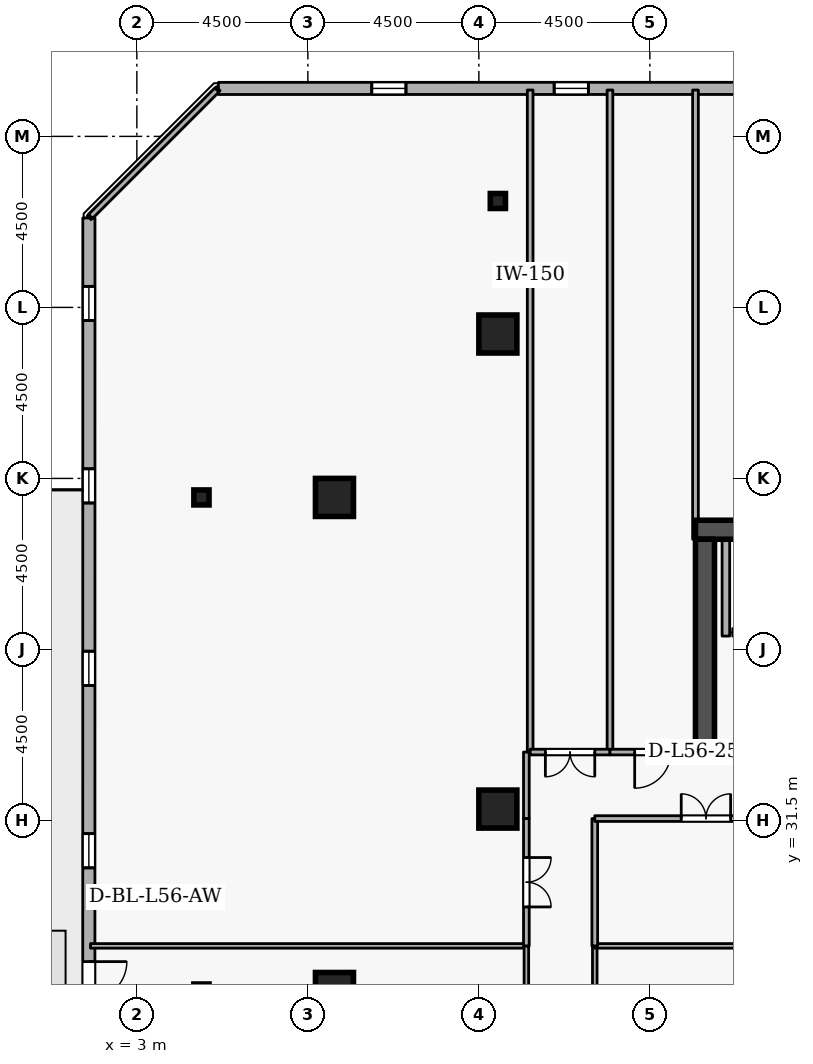
"""IFC4 building model, lengths in metres.
Left out: names, types, materials, properties, quantities, classifications, styles, units other than length and angle.
Written with IfcOpenShell. Run it as: python <this file> out.ifc"""

import sys

from ifc_helpers import new_model, si_unit, direction, frame, frame_2d, origin, origin_2d, place, context, subcontext, project, spatial, rectangle, i_section, extrude, element, fill, save


model = new_model("IFC4")
c1 = context("Model", 3, precision=1e-05, world=origin(), true_north=direction((0.0, 1.0)))
c2 = subcontext(c1, "Body", "Model", "MODEL_VIEW")
j1 = project(units=[si_unit("LENGTHUNIT", "METRE"), si_unit("PLANEANGLEUNIT", "RADIAN")], contexts=[c1])
p1 = place(None, origin())
s1 = spatial("IfcSite", under=j1, at=p1, CompositionType="ELEMENT")
p2 = place(p1, origin())
s2 = spatial("IfcBuilding", under=s1, at=p2, CompositionType="ELEMENT")
p3 = place(p2, frame((0.0, 0.0, 210.9)))
s3 = spatial("IfcBuildingStorey", under=s2, at=p3, CompositionType="ELEMENT", Elevation=210.9)
p4 = place(p3, frame((17.7, 39.15, 0.0), z_axis=(0.0, 0.0, 1.0), x_axis=(1.0, 0.0, 0.0)))
e1 = element("IfcWall", 1, at=p4, inside=s3, PredefinedType="SHEAR", context=c2, shape_type="SweptSolid", body=[
    extrude(rectangle(XDim=15.6, YDim=0.5, at=frame_2d((7.8, 0.0))), origin(), (0.0, 0.0, 1.0), 3.6),
])
p5 = place(p3, frame((17.95, 33.1, 0.0), z_axis=(0.0, 0.0, 1.0), x_axis=(0.0, 1.0, 0.0)))
e2 = element("IfcWall", 2, at=p5, inside=s3, PredefinedType="SHEAR", context=c2, shape_type="SweptSolid", body=[
    extrude(rectangle(XDim=5.8, YDim=0.5, at=frame_2d((2.9, 0.0))), origin(), (0.0, 0.0, 1.0), 3.6),
])
for number, where, z_axis, x_axis in (
    (3, (12.5, 44.3, 0.0), (0.0, 0.0, 1.0), (1.0, 0.0, 0.0)),
    (4, (8.2, 27.0, 0.0), (0.0, 0.0, 1.0), (1.0, 0.0, 0.0)),
    (5, (8.2, 40.0, 0.0), (0.0, 0.0, 1.0), (1.0, 0.0, 0.0)),
    (6, (12.5, 31.8, 0.0), (0.0, 0.0, 1.0), (1.0, 0.0, 0.0)),
):
    element("IfcColumn", number, at=place(p3, frame(where, z_axis=z_axis, x_axis=x_axis)), inside=s3, PredefinedType="COLUMN", context=c2, shape_type="SweptSolid", body=[
        extrude(rectangle(XDim=1.0, YDim=1.0, at=origin_2d()), origin(), (0.0, 0.0, 1.0), 3.6),
    ])
for number, where, z_axis, x_axis in (
    (7, (12.5, 47.8, 0.0), (0.0, 0.0, 1.0), (1.0, 0.0, 0.0)),
    (8, (4.7, 40.0, 0.0), (0.0, 0.0, 1.0), (1.0, 0.0, 0.0)),
):
    element("IfcColumn", number, at=place(p3, frame(where, z_axis=z_axis, x_axis=x_axis)), inside=s3, PredefinedType="COLUMN", context=c2, shape_type="SweptSolid", body=[
        extrude(i_section(OverallWidth=0.399, OverallDepth=0.394, WebThickness=0.023, FlangeThickness=0.037, FilletRadius=0.015, at=origin_2d()), origin(), (0.0, 0.0, 1.0), 3.6),
    ])
p6 = place(p3, frame((40.681, 50.765, 0.0), z_axis=(0.0, 0.0, 1.0), x_axis=(-0.999999997144, -7.5574884e-05, 0.0)))
e9 = element("IfcWall", 9, at=p6, inside=s3, PredefinedType="STANDARD", context=c2, shape_type="SweptSolid", body=[
    extrude(rectangle(XDim=35.535, YDim=0.32, at=frame_2d((17.768, 0.0))), origin(), (0.0, 0.0, 1.0), 2.7),
])
p7 = place(p6, frame((1.8, 0.0, 0.72)))
e10 = element("IfcOpeningElement", 10, at=p7, cuts=e9, PredefinedType="OPENING", context=c2, shape_type="SweptSolid", body=[
    extrude(rectangle(XDim=0.9, YDim=1.75, at=frame_2d((0.45, 0.875))), frame((0.0, 0.17, 0.0), z_axis=(0.0, -1.0, 0.0), x_axis=(1.0, 0.0, 0.0)), (0.0, 0.0, 1.0), 0.34),
])
p8 = place(p6, frame((6.6, 0.0, 0.72)))
e11 = element("IfcOpeningElement", 11, at=p8, cuts=e9, PredefinedType="OPENING", context=c2, shape_type="SweptSolid", body=[
    extrude(rectangle(XDim=0.9, YDim=1.75, at=frame_2d((0.45, 0.875))), frame((0.0, 0.17, 0.0), z_axis=(0.0, -1.0, 0.0), x_axis=(1.0, 0.0, 0.0)), (0.0, 0.0, 1.0), 0.34),
])
p9 = place(p6, frame((11.4, 0.0, 0.72)))
e12 = element("IfcOpeningElement", 12, at=p9, cuts=e9, PredefinedType="OPENING", context=c2, shape_type="SweptSolid", body=[
    extrude(rectangle(XDim=0.9, YDim=1.75, at=frame_2d((0.45, 0.875))), frame((0.0, 0.17, 0.0), z_axis=(0.0, -1.0, 0.0), x_axis=(1.0, 0.0, 0.0)), (0.0, 0.0, 1.0), 0.34),
])
p10 = place(p6, frame((16.2, 0.0, 0.72)))
e13 = element("IfcOpeningElement", 13, at=p10, cuts=e9, PredefinedType="OPENING", context=c2, shape_type="SweptSolid", body=[
    extrude(rectangle(XDim=0.9, YDim=1.75, at=frame_2d((0.45, 0.875))), frame((0.0, 0.17, 0.0), z_axis=(0.0, -1.0, 0.0), x_axis=(1.0, 0.0, 0.0)), (0.0, 0.0, 1.0), 0.34),
])
p11 = place(p6, frame((21.0, 0.0, 0.72)))
e14 = element("IfcOpeningElement", 14, at=p11, cuts=e9, PredefinedType="OPENING", context=c2, shape_type="SweptSolid", body=[
    extrude(rectangle(XDim=0.9, YDim=1.75, at=frame_2d((0.45, 0.875))), frame((0.0, 0.17, 0.0), z_axis=(0.0, -1.0, 0.0), x_axis=(1.0, 0.0, 0.0)), (0.0, 0.0, 1.0), 0.34),
])
p12 = place(p6, frame((25.8, 0.0, 0.72)))
e15 = element("IfcOpeningElement", 15, at=p12, cuts=e9, PredefinedType="OPENING", context=c2, shape_type="SweptSolid", body=[
    extrude(rectangle(XDim=0.9, YDim=1.75, at=frame_2d((0.45, 0.875))), frame((0.0, 0.17, 0.0), z_axis=(0.0, -1.0, 0.0), x_axis=(1.0, 0.0, 0.0)), (0.0, 0.0, 1.0), 0.34),
])
p13 = place(p6, frame((30.6, 0.0, 0.72)))
e16 = element("IfcOpeningElement", 16, at=p13, cuts=e9, PredefinedType="OPENING", context=c2, shape_type="SweptSolid", body=[
    extrude(rectangle(XDim=0.9, YDim=1.75, at=frame_2d((0.45, 0.875))), frame((0.0, 0.17, 0.0), z_axis=(0.0, -1.0, 0.0), x_axis=(1.0, 0.0, 0.0)), (0.0, 0.0, 1.0), 0.34),
])
p14 = place(p3, frame((1.738, 47.354, 0.0), z_axis=(0.0, 0.0, 1.0), x_axis=(-7.5574884e-05, -0.999999997144, 0.0)))
e17 = element("IfcWall", 17, at=p14, inside=s3, PredefinedType="STANDARD", context=c2, shape_type="SweptSolid", body=[
    extrude(rectangle(XDim=35.535, YDim=0.32, at=frame_2d((17.768, 0.0))), origin(), (0.0, 0.0, 1.0), 2.7),
])
p15 = place(p14, frame((19.567, 0.0, 0.0)))
e18 = element("IfcOpeningElement", 18, at=p15, cuts=e17, PredefinedType="OPENING", context=c2, shape_type="SweptSolid", body=[
    extrude(rectangle(XDim=1.0, YDim=2.08, at=frame_2d((0.5, 1.04))), frame((0.0, 0.17, 0.0), z_axis=(0.0, -1.0, 0.0), x_axis=(1.0, 0.0, 0.0)), (0.0, 0.0, 1.0), 0.34),
])
p16 = place(p14, frame((1.8, 0.0, 0.72)))
e19 = element("IfcOpeningElement", 19, at=p16, cuts=e17, PredefinedType="OPENING", context=c2, shape_type="SweptSolid", body=[
    extrude(rectangle(XDim=0.9, YDim=1.75, at=frame_2d((0.45, 0.875))), frame((0.0, 0.17, 0.0), z_axis=(0.0, -1.0, 0.0), x_axis=(1.0, 0.0, 0.0)), (0.0, 0.0, 1.0), 0.34),
])
p17 = place(p14, frame((6.6, 0.0, 0.72)))
e20 = element("IfcOpeningElement", 20, at=p17, cuts=e17, PredefinedType="OPENING", context=c2, shape_type="SweptSolid", body=[
    extrude(rectangle(XDim=0.9, YDim=1.75, at=frame_2d((0.45, 0.875))), frame((0.0, 0.17, 0.0), z_axis=(0.0, -1.0, 0.0), x_axis=(1.0, 0.0, 0.0)), (0.0, 0.0, 1.0), 0.34),
])
p18 = place(p14, frame((11.4, 0.0, 0.72)))
e21 = element("IfcOpeningElement", 21, at=p18, cuts=e17, PredefinedType="OPENING", context=c2, shape_type="SweptSolid", body=[
    extrude(rectangle(XDim=0.9, YDim=1.75, at=frame_2d((0.45, 0.875))), frame((0.0, 0.17, 0.0), z_axis=(0.0, -1.0, 0.0), x_axis=(1.0, 0.0, 0.0)), (0.0, 0.0, 1.0), 0.34),
])
p19 = place(p14, frame((16.2, 0.0, 0.72)))
e22 = element("IfcOpeningElement", 22, at=p19, cuts=e17, PredefinedType="OPENING", context=c2, shape_type="SweptSolid", body=[
    extrude(rectangle(XDim=0.9, YDim=1.75, at=frame_2d((0.45, 0.875))), frame((0.0, 0.17, 0.0), z_axis=(0.0, -1.0, 0.0), x_axis=(1.0, 0.0, 0.0)), (0.0, 0.0, 1.0), 0.34),
])
p20 = place(p14, frame((25.8, 0.0, 0.72)))
e23 = element("IfcOpeningElement", 23, at=p20, cuts=e17, PredefinedType="OPENING", context=c2, shape_type="SweptSolid", body=[
    extrude(rectangle(XDim=0.9, YDim=1.75, at=frame_2d((0.45, 0.875))), frame((0.0, 0.17, 0.0), z_axis=(0.0, -1.0, 0.0), x_axis=(1.0, 0.0, 0.0)), (0.0, 0.0, 1.0), 0.34),
])
p21 = place(p14, frame((30.6, 0.0, 0.72)))
e24 = element("IfcOpeningElement", 24, at=p21, cuts=e17, PredefinedType="OPENING", context=c2, shape_type="SweptSolid", body=[
    extrude(rectangle(XDim=0.9, YDim=1.75, at=frame_2d((0.45, 0.875))), frame((0.0, 0.17, 0.0), z_axis=(0.0, -1.0, 0.0), x_axis=(1.0, 0.0, 0.0)), (0.0, 0.0, 1.0), 0.34),
])
p22 = place(p3, frame((20.62, 36.45, 0.0), z_axis=(0.0, 0.0, 1.0), x_axis=(-1.0, 0.0, 0.0)))
e25 = element("IfcWall", 25, at=p22, inside=s3, PredefinedType="STANDARD", context=c2, shape_type="SweptSolid", body=[
    extrude(rectangle(XDim=1.94, YDim=0.2, at=frame_2d((0.97, 0.0))), origin(), (0.0, 0.0, 1.0), 3.34),
])
p23 = place(p22, frame((0.46, 0.0, 0.0)))
e26 = element("IfcOpeningElement", 26, at=p23, cuts=e25, PredefinedType="OPENING", context=c2, shape_type="SweptSolid", body=[
    extrude(rectangle(XDim=1.02, YDim=2.06, at=frame_2d((0.51, 1.03))), frame((0.0, 0.11, 0.0), z_axis=(0.0, -1.0, 0.0), x_axis=(1.0, 0.0, 0.0)), (0.0, 0.0, 1.0), 0.22),
])
p24 = place(p3, frame((18.5, 36.352, 0.0), z_axis=(0.0, 0.0, 1.0), x_axis=(0.0, 1.0, 0.0)))
e27 = element("IfcWall", 27, at=p24, inside=s3, PredefinedType="STANDARD", context=c2, shape_type="SweptSolid", body=[
    extrude(rectangle(XDim=2.536, YDim=0.2, at=frame_2d((1.268, 0.0))), origin(), (0.0, 0.0, 1.0), 3.34),
])
for number, where, z_axis, x_axis in (
    (28, (13.35, 33.3, 0.0), (0.0, 0.0, 1.0), (0.0, 1.0, 0.0)),
    (29, (15.45, 50.72, 0.0), (0.0, 0.0, 1.0), (0.0, -1.0, 0.0)),
):
    element("IfcWall", number, at=place(p3, frame(where, z_axis=z_axis, x_axis=x_axis)), inside=s3, PredefinedType="PARTITIONING", context=c2, shape_type="SweptSolid", body=[
        extrude(rectangle(XDim=17.42, YDim=0.15, at=frame_2d((8.71, 0.0))), origin(), (0.0, 0.0, 1.0), 3.34),
    ])
p25 = place(p3, frame((15.45, 33.3, 0.0), z_axis=(0.0, 0.0, 1.0), x_axis=(-1.0, 0.0, 0.0)))
e30 = element("IfcWall", 30, at=p25, inside=s3, PredefinedType="PARTITIONING", context=c2, shape_type="SweptSolid", body=[
    extrude(rectangle(XDim=2.1, YDim=0.15, at=frame_2d((1.05, 0.0))), origin(), (0.0, 0.0, 1.0), 3.34),
])
p26 = place(p25, frame((0.4, 0.0, 0.0)))
e31 = element("IfcOpeningElement", 31, at=p26, cuts=e30, PredefinedType="OPENING", context=c2, shape_type="SweptSolid", body=[
    extrude(rectangle(XDim=1.3, YDim=2.12, at=frame_2d((0.65, 1.06))), frame((0.0, 0.085, 0.0), z_axis=(0.0, -1.0, 0.0), x_axis=(1.0, 0.0, 0.0)), (0.0, 0.0, 1.0), 0.17),
])
p27 = place(p3, frame((17.7, 50.72, 0.0), z_axis=(0.0, 0.0, 1.0), x_axis=(0.0, -1.0, 0.0)))
e32 = element("IfcWall", 32, at=p27, inside=s3, PredefinedType="PARTITIONING", context=c2, shape_type="SweptSolid", body=[
    extrude(rectangle(XDim=11.82, YDim=0.15, at=frame_2d((5.91, 0.0))), origin(), (0.0, 0.0, 1.0), 2.545),
])
p28 = place(p3, frame((17.7, 33.3, 0.0), z_axis=(0.0, 0.0, 1.0), x_axis=(-1.0, 0.0, 0.0)))
e33 = element("IfcWall", 33, at=p28, inside=s3, PredefinedType="PARTITIONING", context=c2, shape_type="SweptSolid", body=[
    extrude(rectangle(XDim=2.25, YDim=0.15, at=frame_2d((1.125, 0.0))), origin(), (0.0, 0.0, 1.0), 3.34),
])
p29 = place(p28, frame((0.65, 0.0, 0.0)))
e34 = element("IfcOpeningElement", 34, at=p29, cuts=e33, PredefinedType="OPENING", context=c2, shape_type="SweptSolid", body=[
    extrude(rectangle(XDim=0.95, YDim=2.1, at=frame_2d((0.475, 1.05))), frame((0.0, 0.085, 0.0), z_axis=(0.0, -1.0, 0.0), x_axis=(1.0, 0.0, 0.0)), (0.0, 0.0, 1.0), 0.17),
])
p30 = place(p3, frame((1.78, 28.2, 0.0), z_axis=(0.0, 0.0, 1.0), x_axis=(1.0, 0.0, 0.0)))
e35 = element("IfcWall", 35, at=p30, inside=s3, PredefinedType="PARTITIONING", context=c2, shape_type="SweptSolid", body=[
    extrude(rectangle(XDim=11.47, YDim=0.12, at=frame_2d((5.735, 0.0))), origin(), (0.0, 0.0, 1.0), 3.34),
])
p31 = place(p3, frame((13.25, 28.2, 0.0), z_axis=(0.0, 0.0, 1.0), x_axis=(0.0, -1.0, 0.0)))
e36 = element("IfcWall", 36, at=p31, inside=s3, PredefinedType="PARTITIONING", context=c2, shape_type="SweptSolid", body=[
    extrude(rectangle(XDim=5.75, YDim=0.12, at=frame_2d((2.875, 0.0))), origin(), (0.0, 0.0, 1.0), 3.34),
])
p32 = place(p31, frame((2.35, 0.0, 0.0)))
e37 = element("IfcOpeningElement", 37, at=p32, cuts=e36, PredefinedType="OPENING", context=c2, shape_type="SweptSolid", body=[
    extrude(rectangle(XDim=1.05, YDim=2.1, at=frame_2d((0.525, 1.05))), frame((0.0, 0.07, 0.0), z_axis=(0.0, -1.0, 0.0), x_axis=(1.0, 0.0, 0.0)), (0.0, 0.0, 1.0), 0.14),
])
p33 = place(p3, frame((1.78, 47.394, 0.0), z_axis=(0.0, 0.0, 1.0), x_axis=(0.707106781187, 0.707106781187, 0.0)))
e38 = element("IfcWall", 38, at=p33, inside=s3, PredefinedType="PARTITIONING", context=c2, shape_type="SweptSolid", body=[
    extrude(rectangle(XDim=4.703, YDim=0.15, at=frame_2d((2.352, 0.0))), origin(), (0.0, 0.0, 1.0), 3.34),
])
p34 = place(p3, frame((13.25, 33.3, 0.0), z_axis=(0.0, 0.0, 1.0), x_axis=(0.0, -1.0, 0.0)))
e39 = element("IfcWall", 39, at=p34, inside=s3, PredefinedType="PARTITIONING", context=c2, shape_type="SweptSolid", body=[
    extrude(rectangle(XDim=1.75, YDim=0.15, at=frame_2d((0.875, 0.0))), origin(), (0.0, 0.0, 1.0), 3.34),
])
p35 = place(p3, frame((13.25, 31.55, 0.0), z_axis=(0.0, 0.0, 1.0), x_axis=(0.0, -1.0, 0.0)))
e40 = element("IfcWall", 40, at=p35, inside=s3, PredefinedType="PARTITIONING", context=c2, shape_type="SweptSolid", body=[
    extrude(rectangle(XDim=3.35, YDim=0.15, at=frame_2d((1.675, 0.0))), origin(), (0.0, 0.0, 1.0), 3.34),
])
p36 = place(p35, frame((1.025, 0.0, 0.0)))
e41 = element("IfcOpeningElement", 41, at=p36, cuts=e40, PredefinedType="OPENING", context=c2, shape_type="SweptSolid", body=[
    extrude(rectangle(XDim=1.3, YDim=2.12, at=frame_2d((0.65, 1.06))), frame((0.0, 0.085, 0.0), z_axis=(0.0, -1.0, 0.0), x_axis=(1.0, 0.0, 0.0)), (0.0, 0.0, 1.0), 0.17),
])
p37 = place(p3, frame((15.05, 22.45, 0.0), z_axis=(0.0, 0.0, 1.0), x_axis=(0.0, 1.0, 0.0)))
e42 = element("IfcWall", 42, at=p37, inside=s3, PredefinedType="PARTITIONING", context=c2, shape_type="SweptSolid", body=[
    extrude(rectangle(XDim=5.75, YDim=0.12, at=frame_2d((2.875, 0.0))), origin(), (0.0, 0.0, 1.0), 3.34),
])
p38 = place(p3, frame((15.05, 28.2, 0.0), z_axis=(0.0, 0.0, 1.0), x_axis=(1.0, 0.0, 0.0)))
e43 = element("IfcWall", 43, at=p38, inside=s3, PredefinedType="PARTITIONING", context=c2, shape_type="SweptSolid", body=[
    extrude(rectangle(XDim=5.85, YDim=0.12, at=frame_2d((2.925, 0.0))), origin(), (0.0, 0.0, 1.0), 3.34),
])
p39 = place(p3, frame((15.05, 28.2, 0.0), z_axis=(0.0, 0.0, 1.0), x_axis=(0.0, 1.0, 0.0)))
e44 = element("IfcWall", 44, at=p39, inside=s3, PredefinedType="PARTITIONING", context=c2, shape_type="SweptSolid", body=[
    extrude(rectangle(XDim=3.35, YDim=0.15, at=frame_2d((1.675, 0.0))), origin(), (0.0, 0.0, 1.0), 3.34),
])
p40 = place(p3, frame((15.05, 31.55, 0.0), z_axis=(0.0, 0.0, 1.0), x_axis=(1.0, 0.0, 0.0)))
e45 = element("IfcWall", 45, at=p40, inside=s3, PredefinedType="PARTITIONING", context=c2, shape_type="SweptSolid", body=[
    extrude(rectangle(XDim=5.85, YDim=0.15, at=frame_2d((2.925, 0.0))), origin(), (0.0, 0.0, 1.0), 3.34),
])
p41 = place(p40, frame((2.275, 0.0, 0.0)))
e46 = element("IfcOpeningElement", 46, at=p41, cuts=e45, PredefinedType="OPENING", context=c2, shape_type="SweptSolid", body=[
    extrude(rectangle(XDim=1.3, YDim=2.12, at=frame_2d((0.65, 1.06))), frame((0.0, 0.085, 0.0), z_axis=(0.0, -1.0, 0.0), x_axis=(1.0, 0.0, 0.0)), (0.0, 0.0, 1.0), 0.17),
])
p42 = place(p12, origin())
e47 = element("IfcWindow", 47, at=p42, inside=s3, PartitioningType="SINGLE_PANEL", PredefinedType="WINDOW", context=c2, shape_type="SweptSolid", body=[
    extrude(rectangle(XDim=0.9, YDim=1.75, at=frame_2d((0.45, 0.875))), frame((0.0, 0.03, 0.0), z_axis=(0.0, -1.0, 0.0), x_axis=(1.0, 0.0, 0.0)), (0.0, 0.0, 1.0), 0.06),
])
fill(e15, e47)
p43 = place(p13, origin())
e48 = element("IfcWindow", 48, at=p43, inside=s3, PartitioningType="SINGLE_PANEL", PredefinedType="WINDOW", context=c2, shape_type="SweptSolid", body=[
    extrude(rectangle(XDim=0.9, YDim=1.75, at=frame_2d((0.45, 0.875))), frame((0.0, 0.03, 0.0), z_axis=(0.0, -1.0, 0.0), x_axis=(1.0, 0.0, 0.0)), (0.0, 0.0, 1.0), 0.06),
])
fill(e16, e48)
p44 = place(p15, origin())
e49 = element("IfcDoor", 49, at=p44, inside=s3, OperationType="SINGLE_SWING_LEFT", PredefinedType="DOOR", context=c2, shape_type="SweptSolid", body=[
    extrude(rectangle(XDim=1.0, YDim=2.08, at=frame_2d((0.5, 1.04))), frame((0.0, 0.025, 0.0), z_axis=(0.0, -1.0, 0.0), x_axis=(1.0, 0.0, 0.0)), (0.0, 0.0, 1.0), 0.05),
])
fill(e18, e49)
p45 = place(p16, origin())
e50 = element("IfcWindow", 50, at=p45, inside=s3, PartitioningType="SINGLE_PANEL", PredefinedType="WINDOW", context=c2, shape_type="SweptSolid", body=[
    extrude(rectangle(XDim=0.9, YDim=1.75, at=frame_2d((0.45, 0.875))), frame((0.0, 0.03, 0.0), z_axis=(0.0, -1.0, 0.0), x_axis=(1.0, 0.0, 0.0)), (0.0, 0.0, 1.0), 0.06),
])
fill(e19, e50)
p46 = place(p17, origin())
e51 = element("IfcWindow", 51, at=p46, inside=s3, PartitioningType="SINGLE_PANEL", PredefinedType="WINDOW", context=c2, shape_type="SweptSolid", body=[
    extrude(rectangle(XDim=0.9, YDim=1.75, at=frame_2d((0.45, 0.875))), frame((0.0, 0.03, 0.0), z_axis=(0.0, -1.0, 0.0), x_axis=(1.0, 0.0, 0.0)), (0.0, 0.0, 1.0), 0.06),
])
fill(e20, e51)
p47 = place(p18, origin())
e52 = element("IfcWindow", 52, at=p47, inside=s3, PartitioningType="SINGLE_PANEL", PredefinedType="WINDOW", context=c2, shape_type="SweptSolid", body=[
    extrude(rectangle(XDim=0.9, YDim=1.75, at=frame_2d((0.45, 0.875))), frame((0.0, 0.03, 0.0), z_axis=(0.0, -1.0, 0.0), x_axis=(1.0, 0.0, 0.0)), (0.0, 0.0, 1.0), 0.06),
])
fill(e21, e52)
p48 = place(p19, origin())
e53 = element("IfcWindow", 53, at=p48, inside=s3, PartitioningType="SINGLE_PANEL", PredefinedType="WINDOW", context=c2, shape_type="SweptSolid", body=[
    extrude(rectangle(XDim=0.9, YDim=1.75, at=frame_2d((0.45, 0.875))), frame((0.0, 0.03, 0.0), z_axis=(0.0, -1.0, 0.0), x_axis=(1.0, 0.0, 0.0)), (0.0, 0.0, 1.0), 0.06),
])
fill(e22, e53)
p49 = place(p26, origin())
e54 = element("IfcDoor", 54, at=p49, inside=s3, OperationType="DOUBLE_DOOR_SINGLE_SWING", PredefinedType="DOOR", context=c2, shape_type="SweptSolid", body=[
    extrude(rectangle(XDim=1.3, YDim=2.12, at=frame_2d((0.65, 1.06))), frame((0.0, 0.025, 0.0), z_axis=(0.0, -1.0, 0.0), x_axis=(1.0, 0.0, 0.0)), (0.0, 0.0, 1.0), 0.05),
])
fill(e31, e54)
p50 = place(p29, origin())
e55 = element("IfcDoor", 55, at=p50, inside=s3, OperationType="SINGLE_SWING_RIGHT", PredefinedType="DOOR", context=c2, shape_type="SweptSolid", body=[
    extrude(rectangle(XDim=0.95, YDim=2.1, at=frame_2d((0.475, 1.05))), frame((0.0, 0.025, 0.0), z_axis=(0.0, -1.0, 0.0), x_axis=(1.0, 0.0, 0.0)), (0.0, 0.0, 1.0), 0.05),
])
fill(e34, e55)
p51 = place(p36, origin())
e56 = element("IfcDoor", 56, at=p51, inside=s3, OperationType="DOUBLE_DOOR_SINGLE_SWING", PredefinedType="DOOR", context=c2, shape_type="SweptSolid", body=[
    extrude(rectangle(XDim=1.3, YDim=2.12, at=frame_2d((0.65, 1.06))), frame((0.0, 0.025, 0.0), z_axis=(0.0, -1.0, 0.0), x_axis=(1.0, 0.0, 0.0)), (0.0, 0.0, 1.0), 0.05),
])
fill(e41, e56)
p52 = place(p41, origin())
e57 = element("IfcDoor", 57, at=p52, inside=s3, OperationType="DOUBLE_DOOR_SINGLE_SWING", PredefinedType="DOOR", context=c2, shape_type="SweptSolid", body=[
    extrude(rectangle(XDim=1.3, YDim=2.12, at=frame_2d((0.65, 1.06))), frame((0.0, 0.025, 0.0), z_axis=(0.0, -1.0, 0.0), x_axis=(1.0, 0.0, 0.0)), (0.0, 0.0, 1.0), 0.05),
])
fill(e46, e57)
save(model, sys.argv[1])
